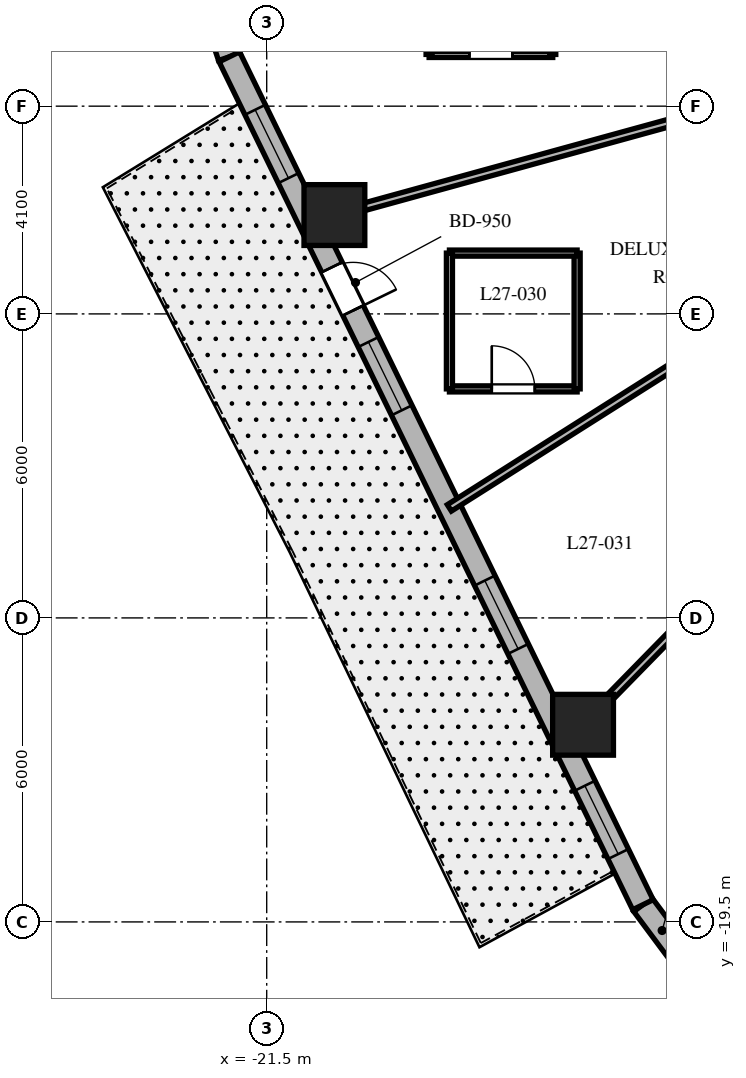
"""IFC4 building model, lengths in metres.
Left out: names, types, materials, properties, quantities, classifications, styles, units other than length and angle.
Written with IfcOpenShell. Run it as: python <this file> out.ifc"""

import sys

from ifc_helpers import new_model, si_unit, direction, frame, frame_2d, origin, origin_2d, place, context, subcontext, project, spatial, rectangle, extrude, element, fill, save


model = new_model("IFC4")
c1 = context("Model", 3, precision=1e-05, world=origin(), true_north=direction((0.0, 1.0)))
c2 = subcontext(c1, "Body", "Model", "MODEL_VIEW")
j1 = project(units=[si_unit("LENGTHUNIT", "METRE"), si_unit("PLANEANGLEUNIT", "RADIAN")], contexts=[c1])
p1 = place(None, origin())
s1 = spatial("IfcSite", under=j1, at=p1, CompositionType="ELEMENT")
p2 = place(p1, origin())
s2 = spatial("IfcBuilding", under=s1, at=p2, CompositionType="ELEMENT")
p3 = place(p2, frame((0.0, 0.0, 113.6)))
s3 = spatial("IfcBuildingStorey", under=s2, at=p3, CompositionType="ELEMENT", Elevation=113.6)
for number, where, z_axis, x_axis in (
    (1, (-20.164, -5.549, 0.0), (0.0, 0.0, 1.0), (1.0, 0.0, 0.0)),
    (2, (-15.257, -15.609, 0.0), (0.0, 0.0, 1.0), (1.0, 0.0, 0.0)),
):
    element("IfcColumn", number, at=place(p3, frame(where, z_axis=z_axis, x_axis=x_axis)), inside=s3, PredefinedType="COLUMN", context=c2, shape_type="SweptSolid", body=[
        extrude(rectangle(XDim=1.2, YDim=1.2, at=origin_2d()), origin(), (0.0, 0.0, 1.0), 3.7),
    ])
p4 = place(p3, frame((-14.076, -19.161, 0.0), z_axis=(0.0, 0.0, 1.0), x_axis=(0.597226657159, -0.802072515412, 0.0)))
e3 = element("IfcWall", 3, at=p4, inside=s3, PredefinedType="SOLIDWALL", context=c2, shape_type="SweptSolid", body=[
    extrude(rectangle(XDim=1.269, YDim=0.45, at=frame_2d((0.635, 0.0))), origin(), (0.0, 0.0, 1.0), 3.4),
])
p5 = place(p3, frame((-22.522, -1.577, 0.0), z_axis=(0.0, 0.0, 1.0), x_axis=(0.317372694837, -0.948300887151, 0.0)))
e4 = element("IfcWall", 4, at=p5, inside=s3, PredefinedType="SOLIDWALL", context=c2, shape_type="SweptSolid", body=[
    extrude(rectangle(XDim=0.896, YDim=0.45, at=frame_2d((0.448, 0.0))), origin(), (0.0, 0.0, 1.0), 3.4),
])
p6 = place(p3, frame((-22.238, -2.427, 0.0), z_axis=(0.0, 0.0, 1.0), x_axis=(0.438374803278, -0.898792262901, 0.0)))
e5 = element("IfcWall", 5, at=p6, inside=s3, PredefinedType="SOLIDWALL", context=c2, shape_type="SweptSolid", body=[
    extrude(rectangle(XDim=18.618, YDim=0.45, at=frame_2d((9.309, 0.0))), origin(), (0.0, 0.0, 1.0), 3.4),
])
p7 = place(p6, frame((4.62, 0.0, 0.0)))
e6 = element("IfcOpeningElement", 6, at=p7, cuts=e5, PredefinedType="OPENING", context=c2, shape_type="SweptSolid", body=[
    extrude(rectangle(XDim=0.95, YDim=2.15, at=frame_2d((0.475, 1.075))), frame((0.0, 0.235, 0.0), z_axis=(0.0, -1.0, 0.0), x_axis=(1.0, 0.0, 0.0)), (0.0, 0.0, 1.0), 0.47),
])
p8 = place(p6, frame((1.163, 0.0, 0.8)))
e7 = element("IfcOpeningElement", 7, at=p8, cuts=e5, PredefinedType="OPENING", context=c2, shape_type="SweptSolid", body=[
    extrude(rectangle(XDim=1.5, YDim=1.8, at=frame_2d((0.75, 0.9))), frame((0.0, 0.235, 0.0), z_axis=(0.0, -1.0, 0.0), x_axis=(1.0, 0.0, 0.0)), (0.0, 0.0, 1.0), 0.47),
])
p9 = place(p6, frame((6.262, 0.0, 0.8)))
e8 = element("IfcOpeningElement", 8, at=p9, cuts=e5, PredefinedType="OPENING", context=c2, shape_type="SweptSolid", body=[
    extrude(rectangle(XDim=1.5, YDim=1.8, at=frame_2d((0.75, 0.9))), frame((0.0, 0.235, 0.0), z_axis=(0.0, -1.0, 0.0), x_axis=(1.0, 0.0, 0.0)), (0.0, 0.0, 1.0), 0.47),
])
p10 = place(p6, frame((11.501, 0.0, 0.8)))
e9 = element("IfcOpeningElement", 9, at=p10, cuts=e5, PredefinedType="OPENING", context=c2, shape_type="SweptSolid", body=[
    extrude(rectangle(XDim=1.5, YDim=1.8, at=frame_2d((0.75, 0.9))), frame((0.0, 0.235, 0.0), z_axis=(0.0, -1.0, 0.0), x_axis=(1.0, 0.0, 0.0)), (0.0, 0.0, 1.0), 0.47),
])
p11 = place(p6, frame((16.006, 0.0, 0.8)))
e10 = element("IfcOpeningElement", 10, at=p11, cuts=e5, PredefinedType="OPENING", context=c2, shape_type="SweptSolid", body=[
    extrude(rectangle(XDim=1.5, YDim=1.8, at=frame_2d((0.75, 0.9))), frame((0.0, 0.235, 0.0), z_axis=(0.0, -1.0, 0.0), x_axis=(1.0, 0.0, 0.0)), (0.0, 0.0, 1.0), 0.47),
])
p12 = place(p3, frame((-11.35, -3.123, 0.0), z_axis=(0.0, 0.0, 1.0), x_axis=(-0.964151983214, -0.265350623261, 0.0)))
e11 = element("IfcWall", 11, at=p12, inside=s3, PredefinedType="PARTITIONING", context=c2, shape_type="SweptSolid", body=[
    extrude(rectangle(XDim=9.645, YDim=0.15, at=frame_2d((4.823, 0.0))), origin(), (0.0, 0.0, 1.0), 2.54),
])
p13 = place(p3, frame((-11.35, -7.185, 0.0), z_axis=(0.0, 0.0, 1.0), x_axis=(-0.844928274737, -0.534879622485, 0.0)))
e12 = element("IfcWall", 12, at=p13, inside=s3, PredefinedType="PARTITIONING", context=c2, shape_type="SweptSolid", body=[
    extrude(rectangle(XDim=7.747, YDim=0.15, at=frame_2d((3.874, 0.0))), origin(), (0.0, 0.0, 1.0), 2.54),
])
p14 = place(p3, frame((-9.628, -9.85, 0.0), z_axis=(0.0, 0.0, 1.0), x_axis=(-0.698992824326, -0.715128681805, 0.0)))
e13 = element("IfcWall", 13, at=p14, inside=s3, PredefinedType="PARTITIONING", context=c2, shape_type="SweptSolid", body=[
    extrude(rectangle(XDim=8.579, YDim=0.15, at=frame_2d((4.29, 0.0))), origin(), (0.0, 0.0, 1.0), 2.54),
])
p15 = place(p3, frame((-18.295, -2.379, 0.0), z_axis=(0.0, 0.0, 1.0), x_axis=(1.0, 0.0, 0.0)))
e14 = element("IfcWall", 14, at=p15, inside=s3, PredefinedType="PARTITIONING", context=c2, shape_type="SweptSolid", body=[
    extrude(rectangle(XDim=2.44, YDim=0.12, at=frame_2d((1.22, 0.0))), origin(), (0.0, 0.0, 1.0), 2.84),
])
p16 = place(p15, frame((0.795, 0.0, 0.0)))
e15 = element("IfcOpeningElement", 15, at=p16, cuts=e14, PredefinedType="OPENING", context=c2, shape_type="SweptSolid", body=[
    extrude(rectangle(XDim=0.85, YDim=2.03, at=frame_2d((0.425, 1.015))), frame((0.0, 0.07, 0.0), z_axis=(0.0, -1.0, 0.0), x_axis=(1.0, 0.0, 0.0)), (0.0, 0.0, 1.0), 0.14),
])
for number, where, z_axis, x_axis in (
    (16, (-15.855, -2.379, 0.0), (0.0, 0.0, 1.0), (0.0, 1.0, 0.0)),
    (17, (-18.295, 0.231, 0.0), (0.0, 0.0, 1.0), (0.0, -1.0, 0.0)),
):
    element("IfcWall", number, at=place(p3, frame(where, z_axis=z_axis, x_axis=x_axis)), inside=s3, PredefinedType="PARTITIONING", context=c2, shape_type="SweptSolid", body=[
        extrude(rectangle(XDim=2.61, YDim=0.12, at=frame_2d((1.305, 0.0))), origin(), (0.0, 0.0, 1.0), 3.4),
    ])
p17 = place(p3, frame((-17.894, -8.98, 0.0), z_axis=(0.0, 0.0, 1.0), x_axis=(1.0, 0.0, 0.0)))
e18 = element("IfcWall", 18, at=p17, inside=s3, PredefinedType="PARTITIONING", context=c2, shape_type="SweptSolid", body=[
    extrude(rectangle(XDim=2.52, YDim=0.12, at=frame_2d((1.26, 0.0))), origin(), (0.0, 0.0, 1.0), 3.4),
])
p18 = place(p17, frame((0.835, 0.0, 0.0)))
e19 = element("IfcOpeningElement", 19, at=p18, cuts=e18, PredefinedType="OPENING", context=c2, shape_type="SweptSolid", body=[
    extrude(rectangle(XDim=0.85, YDim=2.03, at=frame_2d((0.425, 1.015))), frame((0.0, 0.07, 0.0), z_axis=(0.0, -1.0, 0.0), x_axis=(1.0, 0.0, 0.0)), (0.0, 0.0, 1.0), 0.14),
])
p19 = place(p3, frame((-15.374, -8.98, 0.0), z_axis=(0.0, 0.0, 1.0), x_axis=(0.0, 1.0, 0.0)))
e20 = element("IfcWall", 20, at=p19, inside=s3, PredefinedType="PARTITIONING", context=c2, shape_type="SweptSolid", body=[
    extrude(rectangle(XDim=2.68, YDim=0.12, at=frame_2d((1.34, 0.0))), origin(), (0.0, 0.0, 1.0), 2.84),
])
p20 = place(p3, frame((-15.374, -6.3, 0.0), z_axis=(0.0, 0.0, 1.0), x_axis=(-1.0, 0.0, 0.0)))
e21 = element("IfcWall", 21, at=p20, inside=s3, PredefinedType="PARTITIONING", context=c2, shape_type="SweptSolid", body=[
    extrude(rectangle(XDim=2.52, YDim=0.12, at=frame_2d((1.26, 0.0))), origin(), (0.0, 0.0, 1.0), 2.84),
])
p21 = place(p3, frame((-17.894, -6.3, 0.0), z_axis=(0.0, 0.0, 1.0), x_axis=(0.0, -1.0, 0.0)))
e22 = element("IfcWall", 22, at=p21, inside=s3, PredefinedType="PARTITIONING", context=c2, shape_type="SweptSolid", body=[
    extrude(rectangle(XDim=2.68, YDim=0.12, at=frame_2d((1.34, 0.0))), origin(), (0.0, 0.0, 1.0), 3.4),
])
p22 = place(p7, origin())
e23 = element("IfcDoor", 23, at=p22, inside=s3, OperationType="SINGLE_SWING_RIGHT", PredefinedType="DOOR", context=c2, shape_type="SweptSolid", body=[
    extrude(rectangle(XDim=0.95, YDim=2.15, at=frame_2d((0.475, 1.075))), frame((0.0, 0.025, 0.0), z_axis=(0.0, -1.0, 0.0), x_axis=(1.0, 0.0, 0.0)), (0.0, 0.0, 1.0), 0.05),
])
fill(e6, e23)
p23 = place(p8, origin())
e24 = element("IfcWindow", 24, at=p23, inside=s3, PartitioningType="SINGLE_PANEL", PredefinedType="WINDOW", context=c2, shape_type="SweptSolid", body=[
    extrude(rectangle(XDim=1.5, YDim=1.8, at=frame_2d((0.75, 0.9))), frame((0.0, 0.03, 0.0), z_axis=(0.0, -1.0, 0.0), x_axis=(1.0, 0.0, 0.0)), (0.0, 0.0, 1.0), 0.06),
])
fill(e7, e24)
p24 = place(p9, origin())
e25 = element("IfcWindow", 25, at=p24, inside=s3, PartitioningType="SINGLE_PANEL", PredefinedType="WINDOW", context=c2, shape_type="SweptSolid", body=[
    extrude(rectangle(XDim=1.5, YDim=1.8, at=frame_2d((0.75, 0.9))), frame((0.0, 0.03, 0.0), z_axis=(0.0, -1.0, 0.0), x_axis=(1.0, 0.0, 0.0)), (0.0, 0.0, 1.0), 0.06),
])
fill(e8, e25)
p25 = place(p10, origin())
e26 = element("IfcWindow", 26, at=p25, inside=s3, PartitioningType="SINGLE_PANEL", PredefinedType="WINDOW", context=c2, shape_type="SweptSolid", body=[
    extrude(rectangle(XDim=1.5, YDim=1.8, at=frame_2d((0.75, 0.9))), frame((0.0, 0.03, 0.0), z_axis=(0.0, -1.0, 0.0), x_axis=(1.0, 0.0, 0.0)), (0.0, 0.0, 1.0), 0.06),
])
fill(e9, e26)
p26 = place(p11, origin())
e27 = element("IfcWindow", 27, at=p26, inside=s3, PartitioningType="SINGLE_PANEL", PredefinedType="WINDOW", context=c2, shape_type="SweptSolid", body=[
    extrude(rectangle(XDim=1.5, YDim=1.8, at=frame_2d((0.75, 0.9))), frame((0.0, 0.03, 0.0), z_axis=(0.0, -1.0, 0.0), x_axis=(1.0, 0.0, 0.0)), (0.0, 0.0, 1.0), 0.06),
])
fill(e10, e27)
p27 = place(p16, origin())
e28 = element("IfcDoor", 28, at=p27, inside=s3, OperationType="SINGLE_SWING_RIGHT", PredefinedType="DOOR", context=c2, shape_type="SweptSolid", body=[
    extrude(rectangle(XDim=0.85, YDim=2.03, at=frame_2d((0.425, 1.015))), frame((0.0, 0.025, 0.0), z_axis=(0.0, -1.0, 0.0), x_axis=(1.0, 0.0, 0.0)), (0.0, 0.0, 1.0), 0.05),
])
fill(e15, e28)
p28 = place(p18, origin())
e29 = element("IfcDoor", 29, at=p28, inside=s3, OperationType="SINGLE_SWING_LEFT", PredefinedType="DOOR", context=c2, shape_type="SweptSolid", body=[
    extrude(rectangle(XDim=0.85, YDim=2.03, at=frame_2d((0.425, 1.015))), frame((0.0, 0.025, 0.0), z_axis=(0.0, -1.0, 0.0), x_axis=(1.0, 0.0, 0.0)), (0.0, 0.0, 1.0), 0.05),
])
fill(e19, e29)
save(model, sys.argv[1])
